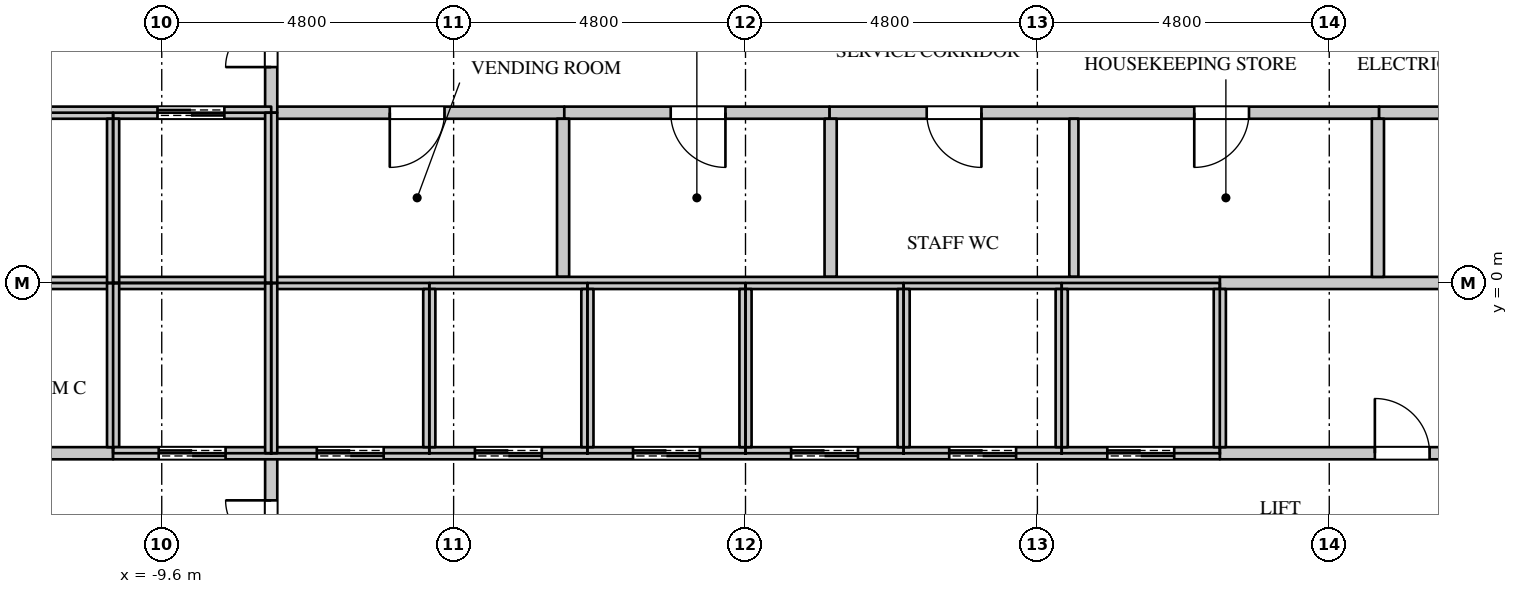
"""IFC4 building model, lengths in metres.
Left out: names, types, materials, properties, quantities, classifications, styles, units other than length and angle.
Written with IfcOpenShell. Run it as: python <this file> out.ifc"""

import sys

from ifc_helpers import new_model, si_unit, direction, frame, frame_2d, origin, place, context, subcontext, project, spatial, rectangle, extrude, element, fill, save


model = new_model("IFC4")
c1 = context("Model", 3, precision=1e-05, world=origin(), true_north=direction((0.0, 1.0)))
c2 = subcontext(c1, "Body", "Model", "MODEL_VIEW")
j1 = project(units=[si_unit("LENGTHUNIT", "METRE"), si_unit("PLANEANGLEUNIT", "RADIAN")], contexts=[c1])
p1 = place(None, origin())
s1 = spatial("IfcSite", under=j1, at=p1, CompositionType="ELEMENT")
p2 = place(p1, origin())
s2 = spatial("IfcBuilding", under=s1, at=p2, CompositionType="ELEMENT")
p3 = place(p2, frame((0.0, 0.0, 213.9)))
s3 = spatial("IfcBuildingStorey", under=s2, at=p3, CompositionType="ELEMENT", Elevation=213.9)
p4 = place(p3, frame((-7.8, 2.8, 0.0), z_axis=(0.0, 0.0, 1.0), x_axis=(1.0, 0.0, 0.0)))
e1 = element("IfcWall", 1, at=p4, inside=s3, PredefinedType="PARTITIONING", context=c2, shape_type="SweptSolid", body=[
    extrude(rectangle(XDim=4.82, YDim=0.2, at=frame_2d((2.41, 0.0))), origin(), (0.0, 0.0, 1.0), 3.95),
])
p5 = place(p4, frame((1.95, 0.0, 0.0)))
e2 = element("IfcOpeningElement", 2, at=p5, cuts=e1, PredefinedType="OPENING", context=c2, shape_type="SweptSolid", body=[
    extrude(rectangle(XDim=0.9, YDim=2.2, at=frame_2d((0.45, 1.1))), frame((0.0, 0.11, 0.0), z_axis=(0.0, -1.0, 0.0), x_axis=(1.0, 0.0, 0.0)), (0.0, 0.0, 1.0), 0.22),
])
p6 = place(p3, frame((-7.8, -8.075, 0.0), z_axis=(0.0, 0.0, 1.0), x_axis=(0.0, 1.0, 0.0)))
e3 = element("IfcWall", 3, at=p6, inside=s3, PredefinedType="PARTITIONING", context=c2, shape_type="SweptSolid", body=[
    extrude(rectangle(XDim=5.275, YDim=0.2, at=frame_2d((2.637, 0.0))), origin(), (0.0, 0.0, 1.0), 3.95),
])
p7 = place(p6, frame((3.0, 0.0, 0.0)))
e4 = element("IfcOpeningElement", 4, at=p7, cuts=e3, PredefinedType="OPENING", context=c2, shape_type="SweptSolid", body=[
    extrude(rectangle(XDim=1.5, YDim=2.4, at=frame_2d((0.75, 1.2))), frame((0.0, 0.11, 0.0), z_axis=(0.0, -1.0, 0.0), x_axis=(1.0, 0.0, 0.0)), (0.0, 0.0, 1.0), 0.22),
])
p8 = place(p3, frame((-7.8, 2.8, 0.0), z_axis=(0.0, 0.0, 1.0), x_axis=(0.0, 1.0, 0.0)))
e5 = element("IfcWall", 5, at=p8, inside=s3, PredefinedType="PARTITIONING", context=c2, shape_type="SweptSolid", body=[
    extrude(rectangle(XDim=5.275, YDim=0.2, at=frame_2d((2.637, 0.0))), origin(), (0.0, 0.0, 1.0), 3.95),
])
p9 = place(p8, frame((0.75, 0.0, 0.0)))
e6 = element("IfcOpeningElement", 6, at=p9, cuts=e5, PredefinedType="OPENING", context=c2, shape_type="SweptSolid", body=[
    extrude(rectangle(XDim=1.5, YDim=2.4, at=frame_2d((0.75, 1.2))), frame((0.0, 0.11, 0.0), z_axis=(0.0, -1.0, 0.0), x_axis=(1.0, 0.0, 0.0)), (0.0, 0.0, 1.0), 0.22),
])
p10 = place(p3, frame((1.38, 2.8, 0.0), z_axis=(0.0, 0.0, 1.0), x_axis=(1.0, 0.0, 0.0)))
e7 = element("IfcWall", 7, at=p10, inside=s3, PredefinedType="PARTITIONING", context=c2, shape_type="SweptSolid", body=[
    extrude(rectangle(XDim=9.04, YDim=0.2, at=frame_2d((4.52, 0.0))), origin(), (0.0, 0.0, 1.0), 3.95),
])
p11 = place(p10, frame((1.6, 0.0, 0.0)))
e8 = element("IfcOpeningElement", 8, at=p11, cuts=e7, PredefinedType="OPENING", context=c2, shape_type="SweptSolid", body=[
    extrude(rectangle(XDim=0.9, YDim=2.2, at=frame_2d((0.45, 1.1))), frame((0.0, 0.11, 0.0), z_axis=(0.0, -1.0, 0.0), x_axis=(1.0, 0.0, 0.0)), (0.0, 0.0, 1.0), 0.22),
])
p12 = place(p10, frame((6.0, 0.0, 0.0)))
e9 = element("IfcOpeningElement", 9, at=p12, cuts=e7, PredefinedType="OPENING", context=c2, shape_type="SweptSolid", body=[
    extrude(rectangle(XDim=0.9, YDim=2.2, at=frame_2d((0.45, 1.1))), frame((0.0, 0.11, 0.0), z_axis=(0.0, -1.0, 0.0), x_axis=(1.0, 0.0, 0.0)), (0.0, 0.0, 1.0), 0.22),
])
p13 = place(p3, frame((5.4, 0.1, 0.0), z_axis=(0.0, 0.0, 1.0), x_axis=(0.0, 1.0, 0.0)))
e10 = element("IfcWall", 10, at=p13, inside=s3, PredefinedType="PARTITIONING", context=c2, shape_type="SweptSolid", body=[
    extrude(rectangle(XDim=2.6, YDim=0.15, at=frame_2d((1.3, 0.0))), origin(), (0.0, 0.0, 1.0), 3.95),
])
p14 = place(p3, frame((-13.77, -2.8, 0.0), z_axis=(0.0, 0.0, 1.0), x_axis=(1.0, 0.0, 0.0)))
e11 = element("IfcWall", 11, at=p14, inside=s3, PredefinedType="PARTITIONING", context=c2, shape_type="SweptSolid", body=[
    extrude(rectangle(XDim=3.37, YDim=0.2, at=frame_2d((1.685, 0.0))), origin(), (0.0, 0.0, 1.0), 3.95),
])
p15 = place(p14, frame((1.35, 0.0, 0.0)))
e12 = element("IfcOpeningElement", 12, at=p15, cuts=e11, PredefinedType="OPENING", context=c2, shape_type="SweptSolid", body=[
    extrude(rectangle(XDim=0.6, YDim=2.0, at=frame_2d((0.3, 1.0))), frame((0.0, 0.11, 0.0), z_axis=(0.0, -1.0, 0.0), x_axis=(1.0, 0.0, 0.0)), (0.0, 0.0, 1.0), 0.22),
])
p16 = place(p3, frame((-2.98, 2.8, 0.0), z_axis=(0.0, 0.0, 1.0), x_axis=(1.0, 0.0, 0.0)))
e13 = element("IfcWall", 13, at=p16, inside=s3, PredefinedType="PARTITIONING", context=c2, shape_type="SweptSolid", body=[
    extrude(rectangle(XDim=4.36, YDim=0.2, at=frame_2d((2.18, 0.0))), origin(), (0.0, 0.0, 1.0), 3.95),
])
p17 = place(p16, frame((1.75, 0.0, 0.0)))
e14 = element("IfcOpeningElement", 14, at=p17, cuts=e13, PredefinedType="OPENING", context=c2, shape_type="SweptSolid", body=[
    extrude(rectangle(XDim=0.9, YDim=2.2, at=frame_2d((0.45, 1.1))), frame((0.0, 0.11, 0.0), z_axis=(0.0, -1.0, 0.0), x_axis=(1.0, 0.0, 0.0)), (0.0, 0.0, 1.0), 0.22),
])
for number, where, z_axis, x_axis in (
    (15, (-3.0, 0.1, 0.0), (0.0, 0.0, 1.0), (0.0, 1.0, 0.0)),
    (16, (1.4, 0.1, 0.0), (0.0, 0.0, 1.0), (0.0, 1.0, 0.0)),
):
    element("IfcWall", number, at=place(p3, frame(where, z_axis=z_axis, x_axis=x_axis)), inside=s3, PredefinedType="PARTITIONING", context=c2, shape_type="SweptSolid", body=[
        extrude(rectangle(XDim=2.6, YDim=0.2, at=frame_2d((1.3, 0.0))), origin(), (0.0, 0.0, 1.0), 3.95),
    ])
p18 = place(p3, frame((7.8, -2.8, 0.0), z_axis=(0.0, 0.0, 1.0), x_axis=(1.0, 0.0, 0.0)))
e17 = element("IfcWall", 17, at=p18, inside=s3, PredefinedType="PARTITIONING", context=c2, shape_type="SweptSolid", body=[
    extrude(rectangle(XDim=5.97, YDim=0.2, at=frame_2d((2.985, 0.0))), origin(), (0.0, 0.0, 1.0), 3.95),
])
p19 = place(p18, frame((2.55, 0.0, 0.0)))
e18 = element("IfcOpeningElement", 18, at=p19, cuts=e17, PredefinedType="OPENING", context=c2, shape_type="SweptSolid", body=[
    extrude(rectangle(XDim=0.9, YDim=2.2, at=frame_2d((0.45, 1.1))), frame((0.0, 0.11, 0.0), z_axis=(0.0, -1.0, 0.0), x_axis=(1.0, 0.0, 0.0)), (0.0, 0.0, 1.0), 0.22),
])
p20 = place(p3, frame((7.8, 0.0, 0.0), z_axis=(0.0, 0.0, 1.0), x_axis=(1.0, 0.0, 0.0)))
e19 = element("IfcWall", 19, at=p20, inside=s3, PredefinedType="PARTITIONING", context=c2, shape_type="SweptSolid", body=[
    extrude(rectangle(XDim=5.97, YDim=0.2, at=frame_2d((2.985, 0.0))), origin(), (0.0, 0.0, 1.0), 3.95),
])
p21 = place(p3, frame((10.42, 2.8, 0.0), z_axis=(0.0, 0.0, 1.0), x_axis=(1.0, 0.0, 0.0)))
e20 = element("IfcWall", 20, at=p21, inside=s3, PredefinedType="PARTITIONING", context=c2, shape_type="SweptSolid", body=[
    extrude(rectangle(XDim=3.35, YDim=0.2, at=frame_2d((1.675, 0.0))), origin(), (0.0, 0.0, 1.0), 3.95),
])
p22 = place(p21, frame((1.35, 0.0, 0.0)))
e21 = element("IfcOpeningElement", 21, at=p22, cuts=e20, PredefinedType="OPENING", context=c2, shape_type="SweptSolid", body=[
    extrude(rectangle(XDim=0.6, YDim=2.0, at=frame_2d((0.3, 1.0))), frame((0.0, 0.11, 0.0), z_axis=(0.0, -1.0, 0.0), x_axis=(1.0, 0.0, 0.0)), (0.0, 0.0, 1.0), 0.22),
])
p23 = place(p3, frame((10.4, 0.1, 0.0), z_axis=(0.0, 0.0, 1.0), x_axis=(0.0, 1.0, 0.0)))
e22 = element("IfcWall", 22, at=p23, inside=s3, PredefinedType="PARTITIONING", context=c2, shape_type="SweptSolid", body=[
    extrude(rectangle(XDim=2.6, YDim=0.2, at=frame_2d((1.3, 0.0))), origin(), (0.0, 0.0, 1.0), 3.95),
])
p24 = place(p3, frame((-13.77, 0.0, 0.0), z_axis=(0.0, 0.0, 1.0), x_axis=(1.0, 0.0, 0.0)))
e23 = element("IfcWall", 23, at=p24, inside=s3, PredefinedType="PARTITIONING", context=c2, shape_type="SweptSolid", body=[
    extrude(rectangle(XDim=21.57, YDim=0.2, at=frame_2d((10.785, 0.0))), origin(), (0.0, 0.0, 1.0), 3.95),
])
p25 = place(p3, frame((-13.77, 2.8, 0.0), z_axis=(0.0, 0.0, 1.0), x_axis=(1.0, 0.0, 0.0)))
e24 = element("IfcWall", 24, at=p25, inside=s3, PredefinedType="PARTITIONING", context=c2, shape_type="SweptSolid", body=[
    extrude(rectangle(XDim=5.97, YDim=0.2, at=frame_2d((2.985, 0.0))), origin(), (0.0, 0.0, 1.0), 3.95),
])
p26 = place(p25, frame((1.1, 0.0, 0.0)))
e25 = element("IfcOpeningElement", 25, at=p26, cuts=e24, PredefinedType="OPENING", context=c2, shape_type="SweptSolid", body=[
    extrude(rectangle(XDim=1.1, YDim=2.2, at=frame_2d((0.55, 1.1))), frame((0.0, 0.11, 0.0), z_axis=(0.0, -1.0, 0.0), x_axis=(1.0, 0.0, 0.0)), (0.0, 0.0, 1.0), 0.22),
])
p27 = place(p25, frame((4.1, 0.0, 0.0)))
e26 = element("IfcOpeningElement", 26, at=p27, cuts=e24, PredefinedType="OPENING", context=c2, shape_type="SweptSolid", body=[
    extrude(rectangle(XDim=1.1, YDim=2.2, at=frame_2d((0.55, 1.1))), frame((0.0, 0.11, 0.0), z_axis=(0.0, -1.0, 0.0), x_axis=(1.0, 0.0, 0.0)), (0.0, 0.0, 1.0), 0.22),
])
p28 = place(p3, frame((-10.4, -2.7, 0.0), z_axis=(0.0, 0.0, 1.0), x_axis=(0.0, 1.0, 0.0)))
e27 = element("IfcWall", 27, at=p28, inside=s3, PredefinedType="PARTITIONING", context=c2, shape_type="SweptSolid", body=[
    extrude(rectangle(XDim=2.7, YDim=0.2, at=frame_2d((1.35, 0.0))), origin(), (0.0, 0.0, 1.0), 3.95),
])
p29 = place(p3, frame((-10.4, -2.8, 0.0), z_axis=(0.0, 0.0, 1.0), x_axis=(1.0, 0.0, 0.0)))
e28 = element("IfcWall", 28, at=p29, inside=s3, PredefinedType="PARTITIONING", context=c2, shape_type="SweptSolid", body=[
    extrude(rectangle(XDim=18.2, YDim=0.2, at=frame_2d((9.1, 0.0))), origin(), (0.0, 0.0, 1.0), 3.95),
])
p30 = place(p29, frame((0.75, 0.0, 0.0)))
e29 = element("IfcOpeningElement", 29, at=p30, cuts=e28, PredefinedType="OPENING", context=c2, shape_type="SweptSolid", body=[
    extrude(rectangle(XDim=1.1, YDim=2.2, at=frame_2d((0.55, 1.1))), frame((0.0, 0.11, 0.0), z_axis=(0.0, -1.0, 0.0), x_axis=(1.0, 0.0, 0.0)), (0.0, 0.0, 1.0), 0.22),
])
p31 = place(p29, frame((3.35, 0.0, 0.0)))
e30 = element("IfcOpeningElement", 30, at=p31, cuts=e28, PredefinedType="OPENING", context=c2, shape_type="SweptSolid", body=[
    extrude(rectangle(XDim=1.1, YDim=2.2, at=frame_2d((0.55, 1.1))), frame((0.0, 0.11, 0.0), z_axis=(0.0, -1.0, 0.0), x_axis=(1.0, 0.0, 0.0)), (0.0, 0.0, 1.0), 0.22),
])
p32 = place(p29, frame((5.95, 0.0, 0.0)))
e31 = element("IfcOpeningElement", 31, at=p32, cuts=e28, PredefinedType="OPENING", context=c2, shape_type="SweptSolid", body=[
    extrude(rectangle(XDim=1.1, YDim=2.2, at=frame_2d((0.55, 1.1))), frame((0.0, 0.11, 0.0), z_axis=(0.0, -1.0, 0.0), x_axis=(1.0, 0.0, 0.0)), (0.0, 0.0, 1.0), 0.22),
])
p33 = place(p29, frame((8.55, 0.0, 0.0)))
e32 = element("IfcOpeningElement", 32, at=p33, cuts=e28, PredefinedType="OPENING", context=c2, shape_type="SweptSolid", body=[
    extrude(rectangle(XDim=1.1, YDim=2.2, at=frame_2d((0.55, 1.1))), frame((0.0, 0.11, 0.0), z_axis=(0.0, -1.0, 0.0), x_axis=(1.0, 0.0, 0.0)), (0.0, 0.0, 1.0), 0.22),
])
p34 = place(p29, frame((11.15, 0.0, 0.0)))
e33 = element("IfcOpeningElement", 33, at=p34, cuts=e28, PredefinedType="OPENING", context=c2, shape_type="SweptSolid", body=[
    extrude(rectangle(XDim=1.1, YDim=2.2, at=frame_2d((0.55, 1.1))), frame((0.0, 0.11, 0.0), z_axis=(0.0, -1.0, 0.0), x_axis=(1.0, 0.0, 0.0)), (0.0, 0.0, 1.0), 0.22),
])
p35 = place(p29, frame((13.75, 0.0, 0.0)))
e34 = element("IfcOpeningElement", 34, at=p35, cuts=e28, PredefinedType="OPENING", context=c2, shape_type="SweptSolid", body=[
    extrude(rectangle(XDim=1.1, YDim=2.2, at=frame_2d((0.55, 1.1))), frame((0.0, 0.11, 0.0), z_axis=(0.0, -1.0, 0.0), x_axis=(1.0, 0.0, 0.0)), (0.0, 0.0, 1.0), 0.22),
])
p36 = place(p29, frame((16.35, 0.0, 0.0)))
e35 = element("IfcOpeningElement", 35, at=p36, cuts=e28, PredefinedType="OPENING", context=c2, shape_type="SweptSolid", body=[
    extrude(rectangle(XDim=1.1, YDim=2.2, at=frame_2d((0.55, 1.1))), frame((0.0, 0.11, 0.0), z_axis=(0.0, -1.0, 0.0), x_axis=(1.0, 0.0, 0.0)), (0.0, 0.0, 1.0), 0.22),
])
p37 = place(p3, frame((-10.4, 0.0, 0.0), z_axis=(0.0, 0.0, 1.0), x_axis=(0.0, 1.0, 0.0)))
e36 = element("IfcWall", 36, at=p37, inside=s3, PredefinedType="PARTITIONING", context=c2, shape_type="SweptSolid", body=[
    extrude(rectangle(XDim=2.7, YDim=0.2, at=frame_2d((1.35, 0.0))), origin(), (0.0, 0.0, 1.0), 3.95),
])
for number, where, z_axis, x_axis in (
    (37, (-7.8, -2.8, 0.0), (0.0, 0.0, 1.0), (0.0, 1.0, 0.0)),
    (38, (-7.8, 0.0, 0.0), (0.0, 0.0, 1.0), (0.0, 1.0, 0.0)),
):
    element("IfcWall", number, at=place(p3, frame(where, z_axis=z_axis, x_axis=x_axis)), inside=s3, PredefinedType="PARTITIONING", context=c2, shape_type="SweptSolid", body=[
        extrude(rectangle(XDim=2.8, YDim=0.2, at=frame_2d((1.4, 0.0))), origin(), (0.0, 0.0, 1.0), 3.95),
    ])
for number, where, z_axis, x_axis in (
    (39, (-5.2, -2.7, 0.0), (0.0, 0.0, 1.0), (0.0, 1.0, 0.0)),
    (40, (-2.6, -2.7, 0.0), (0.0, 0.0, 1.0), (0.0, 1.0, 0.0)),
    (41, (0.0, -2.7, 0.0), (0.0, 0.0, 1.0), (0.0, 1.0, 0.0)),
    (42, (2.6, -2.7, 0.0), (0.0, 0.0, 1.0), (0.0, 1.0, 0.0)),
    (43, (5.2, -2.7, 0.0), (0.0, 0.0, 1.0), (0.0, 1.0, 0.0)),
    (44, (7.8, -2.7, 0.0), (0.0, 0.0, 1.0), (0.0, 1.0, 0.0)),
):
    element("IfcWall", number, at=place(p3, frame(where, z_axis=z_axis, x_axis=x_axis)), inside=s3, PredefinedType="PARTITIONING", context=c2, shape_type="SweptSolid", body=[
        extrude(rectangle(XDim=2.6, YDim=0.2, at=frame_2d((1.3, 0.0))), origin(), (0.0, 0.0, 1.0), 3.95),
    ])
p38 = place(p19, origin())
e45 = element("IfcDoor", 45, at=p38, inside=s3, OperationType="SINGLE_SWING_LEFT", PredefinedType="DOOR", context=c2, shape_type="SweptSolid", body=[
    extrude(rectangle(XDim=0.9, YDim=2.2, at=frame_2d((0.45, 1.1))), frame((0.0, 0.025, 0.0), z_axis=(0.0, -1.0, 0.0), x_axis=(1.0, 0.0, 0.0)), (0.0, 0.0, 1.0), 0.05),
])
fill(e18, e45)
p39 = place(p5, origin())
e46 = element("IfcDoor", 46, at=p39, inside=s3, OperationType="SINGLE_SWING_RIGHT", PredefinedType="DOOR", context=c2, shape_type="SweptSolid", body=[
    extrude(rectangle(XDim=0.9, YDim=2.2, at=frame_2d((0.45, 1.1))), frame((0.0, 0.025, 0.0), z_axis=(0.0, -1.0, 0.0), x_axis=(1.0, 0.0, 0.0)), (0.0, 0.0, 1.0), 0.05),
])
fill(e2, e46)
p40 = place(p17, origin())
e47 = element("IfcDoor", 47, at=p40, inside=s3, OperationType="SINGLE_SWING_LEFT", PredefinedType="DOOR", context=c2, shape_type="SweptSolid", body=[
    extrude(rectangle(XDim=0.9, YDim=2.2, at=frame_2d((0.45, 1.1))), frame((0.0, 0.025, 0.0), z_axis=(0.0, -1.0, 0.0), x_axis=(1.0, 0.0, 0.0)), (0.0, 0.0, 1.0), 0.05),
])
fill(e14, e47)
p41 = place(p11, origin())
e48 = element("IfcDoor", 48, at=p41, inside=s3, OperationType="SINGLE_SWING_LEFT", PredefinedType="DOOR", context=c2, shape_type="SweptSolid", body=[
    extrude(rectangle(XDim=0.9, YDim=2.2, at=frame_2d((0.45, 1.1))), frame((0.0, 0.025, 0.0), z_axis=(0.0, -1.0, 0.0), x_axis=(1.0, 0.0, 0.0)), (0.0, 0.0, 1.0), 0.05),
])
fill(e8, e48)
p42 = place(p12, origin())
e49 = element("IfcDoor", 49, at=p42, inside=s3, OperationType="SINGLE_SWING_RIGHT", PredefinedType="DOOR", context=c2, shape_type="SweptSolid", body=[
    extrude(rectangle(XDim=0.9, YDim=2.2, at=frame_2d((0.45, 1.1))), frame((0.0, 0.025, 0.0), z_axis=(0.0, -1.0, 0.0), x_axis=(1.0, 0.0, 0.0)), (0.0, 0.0, 1.0), 0.05),
])
fill(e9, e49)
p43 = place(p27, origin())
e50 = element("IfcDoor", 50, at=p43, inside=s3, OperationType="DOUBLE_DOOR_SLIDING", PredefinedType="DOOR", context=c2, shape_type="SweptSolid", body=[
    extrude(rectangle(XDim=1.1, YDim=2.2, at=frame_2d((0.55, 1.1))), frame((0.0, 0.025, 0.0), z_axis=(0.0, -1.0, 0.0), x_axis=(1.0, 0.0, 0.0)), (0.0, 0.0, 1.0), 0.05),
])
fill(e26, e50)
p44 = place(p30, origin())
e51 = element("IfcDoor", 51, at=p44, inside=s3, OperationType="DOUBLE_DOOR_SLIDING", PredefinedType="DOOR", context=c2, shape_type="SweptSolid", body=[
    extrude(rectangle(XDim=1.1, YDim=2.2, at=frame_2d((0.55, 1.1))), frame((0.0, 0.025, 0.0), z_axis=(0.0, -1.0, 0.0), x_axis=(1.0, 0.0, 0.0)), (0.0, 0.0, 1.0), 0.05),
])
fill(e29, e51)
p45 = place(p31, origin())
e52 = element("IfcDoor", 52, at=p45, inside=s3, OperationType="DOUBLE_DOOR_SLIDING", PredefinedType="DOOR", context=c2, shape_type="SweptSolid", body=[
    extrude(rectangle(XDim=1.1, YDim=2.2, at=frame_2d((0.55, 1.1))), frame((0.0, 0.025, 0.0), z_axis=(0.0, -1.0, 0.0), x_axis=(1.0, 0.0, 0.0)), (0.0, 0.0, 1.0), 0.05),
])
fill(e30, e52)
p46 = place(p32, origin())
e53 = element("IfcDoor", 53, at=p46, inside=s3, OperationType="DOUBLE_DOOR_SLIDING", PredefinedType="DOOR", context=c2, shape_type="SweptSolid", body=[
    extrude(rectangle(XDim=1.1, YDim=2.2, at=frame_2d((0.55, 1.1))), frame((0.0, 0.025, 0.0), z_axis=(0.0, -1.0, 0.0), x_axis=(1.0, 0.0, 0.0)), (0.0, 0.0, 1.0), 0.05),
])
fill(e31, e53)
p47 = place(p33, origin())
e54 = element("IfcDoor", 54, at=p47, inside=s3, OperationType="DOUBLE_DOOR_SLIDING", PredefinedType="DOOR", context=c2, shape_type="SweptSolid", body=[
    extrude(rectangle(XDim=1.1, YDim=2.2, at=frame_2d((0.55, 1.1))), frame((0.0, 0.025, 0.0), z_axis=(0.0, -1.0, 0.0), x_axis=(1.0, 0.0, 0.0)), (0.0, 0.0, 1.0), 0.05),
])
fill(e32, e54)
p48 = place(p34, origin())
e55 = element("IfcDoor", 55, at=p48, inside=s3, OperationType="DOUBLE_DOOR_SLIDING", PredefinedType="DOOR", context=c2, shape_type="SweptSolid", body=[
    extrude(rectangle(XDim=1.1, YDim=2.2, at=frame_2d((0.55, 1.1))), frame((0.0, 0.025, 0.0), z_axis=(0.0, -1.0, 0.0), x_axis=(1.0, 0.0, 0.0)), (0.0, 0.0, 1.0), 0.05),
])
fill(e33, e55)
p49 = place(p35, origin())
e56 = element("IfcDoor", 56, at=p49, inside=s3, OperationType="DOUBLE_DOOR_SLIDING", PredefinedType="DOOR", context=c2, shape_type="SweptSolid", body=[
    extrude(rectangle(XDim=1.1, YDim=2.2, at=frame_2d((0.55, 1.1))), frame((0.0, 0.025, 0.0), z_axis=(0.0, -1.0, 0.0), x_axis=(1.0, 0.0, 0.0)), (0.0, 0.0, 1.0), 0.05),
])
fill(e34, e56)
p50 = place(p36, origin())
e57 = element("IfcDoor", 57, at=p50, inside=s3, OperationType="DOUBLE_DOOR_SLIDING", PredefinedType="DOOR", context=c2, shape_type="SweptSolid", body=[
    extrude(rectangle(XDim=1.1, YDim=2.2, at=frame_2d((0.55, 1.1))), frame((0.0, 0.025, 0.0), z_axis=(0.0, -1.0, 0.0), x_axis=(1.0, 0.0, 0.0)), (0.0, 0.0, 1.0), 0.05),
])
fill(e35, e57)
p51 = place(p9, origin())
e58 = element("IfcDoor", 58, at=p51, inside=s3, OperationType="DOUBLE_DOOR_SINGLE_SWING", PredefinedType="DOOR", context=c2, shape_type="SweptSolid", body=[
    extrude(rectangle(XDim=1.5, YDim=2.4, at=frame_2d((0.75, 1.2))), frame((0.0, 0.025, 0.0), z_axis=(0.0, -1.0, 0.0), x_axis=(1.0, 0.0, 0.0)), (0.0, 0.0, 1.0), 0.05),
])
fill(e6, e58)
p52 = place(p7, origin())
e59 = element("IfcDoor", 59, at=p52, inside=s3, OperationType="DOUBLE_DOOR_SINGLE_SWING", PredefinedType="DOOR", context=c2, shape_type="SweptSolid", body=[
    extrude(rectangle(XDim=1.5, YDim=2.4, at=frame_2d((0.75, 1.2))), frame((0.0, 0.025, 0.0), z_axis=(0.0, -1.0, 0.0), x_axis=(1.0, 0.0, 0.0)), (0.0, 0.0, 1.0), 0.05),
])
fill(e4, e59)
save(model, sys.argv[1])
